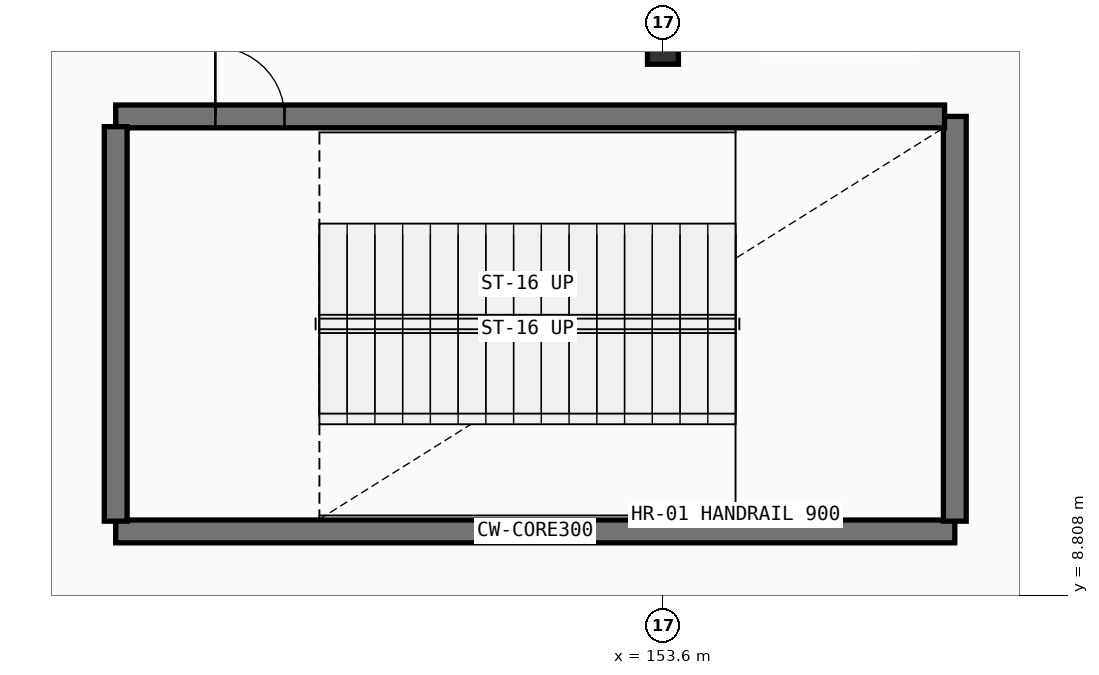
"""IFC4 building model, lengths in metres.
Left out: names, types, materials, properties, quantities, classifications, styles, units other than length and angle.
Written with IfcOpenShell. Run it as: python <this file> out.ifc"""

import sys

from ifc_helpers import new_model, si_unit, direction, frame, frame_2d, origin, origin_2d, place, context, subcontext, project, spatial, rectangle, hollow_circle, extrude, element, fill, save


model = new_model("IFC4")
c1 = context("Model", 3, precision=1e-05, world=origin(), true_north=direction((0.0, 1.0)))
c2 = subcontext(c1, "Body", "Model", "MODEL_VIEW")
j1 = project(units=[si_unit("LENGTHUNIT", "METRE"), si_unit("PLANEANGLEUNIT", "RADIAN")], contexts=[c1])
p1 = place(None, origin())
s1 = spatial("IfcSite", under=j1, at=p1, CompositionType="ELEMENT")
p2 = place(p1, origin())
s2 = spatial("IfcBuilding", under=s1, at=p2, CompositionType="ELEMENT")
p3 = place(p2, origin())
s3 = spatial("IfcBuildingStorey", under=s2, at=p3, CompositionType="ELEMENT", Elevation=0.0)
p4 = place(p3, frame((153.6, 16.0, 0.0), z_axis=(0.0, 0.0, 1.0), x_axis=(1.0, 0.0, 0.0)))
e1 = element("IfcColumn", 1, at=p4, inside=s3, PredefinedType="COLUMN", context=c2, shape_type="SweptSolid", body=[
    extrude(hollow_circle(Radius=0.203, WallThickness=0.02, at=origin_2d()), origin(), (0.0, 0.0, 1.0), 6.0),
])
p5 = place(p3, frame((157.44, 9.65, 0.0), z_axis=(0.0, 0.0, 1.0), x_axis=(-1.0, 0.0, 0.0)))
e2 = element("IfcWall", 2, at=p5, inside=s3, PredefinedType="SHEAR", context=c2, shape_type="SweptSolid", body=[
    extrude(rectangle(XDim=11.04, YDim=0.3, at=frame_2d((5.52, 0.0))), origin(), (0.0, 0.0, 1.0), 5.77),
])
p6 = place(p3, frame((157.44, 15.11, 0.0), z_axis=(0.0, 0.0, 1.0), x_axis=(0.0, -1.0, 0.0)))
e3 = element("IfcWall", 3, at=p6, inside=s3, PredefinedType="SHEAR", context=c2, shape_type="SweptSolid", body=[
    extrude(rectangle(XDim=5.325, YDim=0.3, at=frame_2d((2.663, 0.0))), origin(), (0.0, 0.0, 1.0), 5.77),
])
p7 = place(p3, frame((146.4, 15.11, 0.0), z_axis=(0.0, 0.0, 1.0), x_axis=(1.0, 0.0, 0.0)))
e4 = element("IfcWall", 4, at=p7, inside=s3, PredefinedType="SHEAR", context=c2, shape_type="SweptSolid", body=[
    extrude(rectangle(XDim=10.905, YDim=0.3, at=frame_2d((5.453, 0.0))), origin(), (0.0, 0.0, 1.0), 5.77),
])
p8 = place(p7, frame((1.311, 0.0, 0.0)))
e5 = element("IfcOpeningElement", 5, at=p8, cuts=e4, PredefinedType="OPENING", context=c2, shape_type="SweptSolid", body=[
    extrude(rectangle(XDim=0.91, YDim=2.08, at=frame_2d((0.455, 1.04))), frame((0.0, 0.16, 0.0), z_axis=(0.0, -1.0, 0.0), x_axis=(1.0, 0.0, 0.0)), (0.0, 0.0, 1.0), 0.32),
])
p9 = place(p3, frame((146.4, 9.785, 0.0), z_axis=(0.0, 0.0, 1.0), x_axis=(0.0, 1.0, 0.0)))
e6 = element("IfcWall", 6, at=p9, inside=s3, PredefinedType="SHEAR", context=c2, shape_type="SweptSolid", body=[
    extrude(rectangle(XDim=5.19, YDim=0.3, at=frame_2d((2.595, 0.0))), origin(), (0.0, 0.0, 1.0), 5.77),
])
p10 = place(p8, origin())
e7 = element("IfcDoor", 7, at=p10, inside=s3, OperationType="SINGLE_SWING_LEFT", PredefinedType="DOOR", context=c2, shape_type="SweptSolid", body=[
    extrude(rectangle(XDim=0.91, YDim=2.08, at=frame_2d((0.455, 1.04))), frame((0.0, 0.025, 0.0), z_axis=(0.0, -1.0, 0.0), x_axis=(1.0, 0.0, 0.0)), (0.0, 0.0, 1.0), 0.05),
])
fill(e5, e7)
save(model, sys.argv[1])
